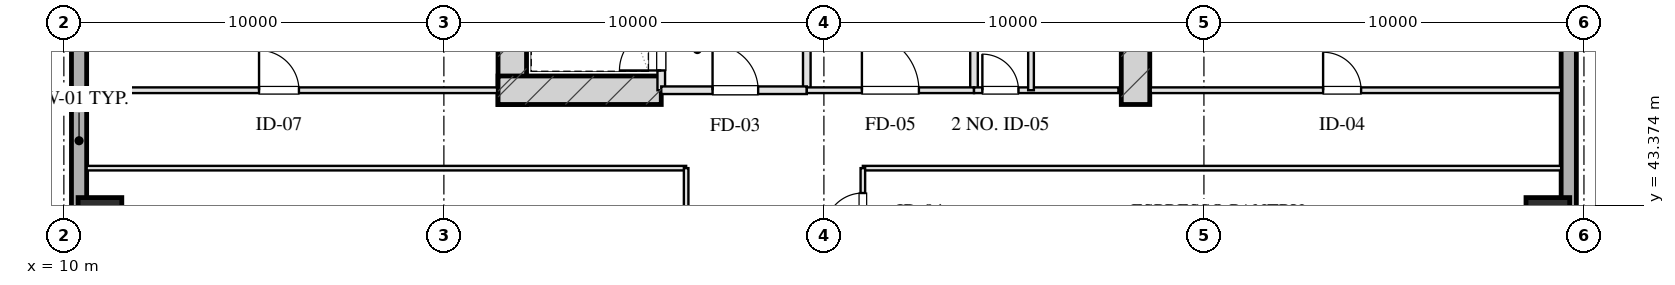
"""IFC4 building model, lengths in metres.
Left out: names, types, materials, properties, quantities, classifications, styles, units other than length and angle.
Written with IfcOpenShell. Run it as: python <this file> out.ifc"""

import sys

from ifc_helpers import new_model, si_unit, direction, frame, frame_2d, origin, origin_2d, place, context, subcontext, project, spatial, rectangle, hollow_rectangle, extrude, element, fill, save


model = new_model("IFC4")
c1 = context("Model", 3, precision=1e-05, world=origin(), true_north=direction((0.0, 1.0)))
c2 = subcontext(c1, "Body", "Model", "MODEL_VIEW")
j1 = project(units=[si_unit("LENGTHUNIT", "METRE"), si_unit("PLANEANGLEUNIT", "RADIAN")], contexts=[c1])
p1 = place(None, origin())
s1 = spatial("IfcSite", under=j1, at=p1, CompositionType="ELEMENT")
p2 = place(p1, origin())
s2 = spatial("IfcBuilding", under=s1, at=p2, CompositionType="ELEMENT")
p3 = place(p2, frame((0.0, 0.0, 60.95)))
s3 = spatial("IfcBuildingStorey", under=s2, at=p3, CompositionType="ELEMENT", Elevation=60.95)
for number, where, z_axis, x_axis in (
    (1, (21.8, 46.025, 0.0), (0.0, 0.0, 1.0), (0.0, 1.0, 0.0)),
    (2, (38.2, 46.025, 0.0), (0.0, 0.0, 1.0), (0.0, 1.0, 0.0)),
):
    element("IfcWall", number, at=place(p3, frame(where, z_axis=z_axis, x_axis=x_axis)), inside=s3, PredefinedType="SHEAR", context=c2, shape_type="SweptSolid", body=[
        extrude(rectangle(XDim=9.63, YDim=0.75, at=frame_2d((4.815, 0.0))), origin(), (0.0, 0.0, 1.0), 3.45),
    ])
p4 = place(p3, frame((21.425, 46.4, 0.0), z_axis=(0.0, 0.0, 1.0), x_axis=(1.0, 0.0, 0.0)))
e3 = element("IfcWall", 3, at=p4, inside=s3, PredefinedType="SHEAR", context=c2, shape_type="SweptSolid", body=[
    extrude(rectangle(XDim=4.295, YDim=0.75, at=frame_2d((2.147, 0.0))), origin(), (0.0, 0.0, 1.0), 3.45),
])
for number, where, z_axis, x_axis in (
    (4, (10.95, 43.0, 0.0), (0.0, 0.0, 1.0), (1.0, 0.0, 0.0)),
    (5, (49.05, 43.0, 0.0), (0.0, 0.0, 1.0), (1.0, 0.0, 0.0)),
):
    element("IfcColumn", number, at=place(p3, frame(where, z_axis=z_axis, x_axis=x_axis)), inside=s3, PredefinedType="COLUMN", context=c2, shape_type="SweptSolid", body=[
        extrude(hollow_rectangle(XDim=1.15, YDim=1.15, WallThickness=0.04, at=origin_2d()), origin(), (0.0, 0.0, 1.0), 3.451),
    ])
p5 = place(p3, frame((10.4, 7.2, 0.0), z_axis=(0.0, 0.0, 1.0), x_axis=(0.0, 1.0, 0.0)))
e6 = element("IfcWall", 6, at=p5, inside=s3, PredefinedType="SOLIDWALL", context=c2, shape_type="SweptSolid", body=[
    extrude(rectangle(XDim=53.6, YDim=0.4, at=frame_2d((26.8, 0.0))), origin(), (0.0, 0.0, 1.0), 2.61),
])
p6 = place(p5, frame((31.95, 0.0, 0.75)))
e7 = element("IfcOpeningElement", 7, at=p6, cuts=e6, PredefinedType="OPENING", context=c2, shape_type="SweptSolid", body=[
    extrude(rectangle(XDim=2.5, YDim=1.46, at=frame_2d((1.25, 0.73))), frame((0.0, 0.21, 0.0), z_axis=(0.0, -1.0, 0.0), x_axis=(1.0, 0.0, 0.0)), (0.0, 0.0, 1.0), 0.42),
])
p7 = place(p5, frame((20.292, 0.0, 0.0)))
e8 = element("IfcOpeningElement", 8, at=p7, cuts=e6, PredefinedType="OPENING", context=c2, shape_type="SweptSolid", body=[
    extrude(rectangle(XDim=1.1, YDim=2.15, at=frame_2d((0.55, 1.075))), frame((0.0, 0.21, 0.0), z_axis=(0.0, -1.0, 0.0), x_axis=(1.0, 0.0, 0.0)), (0.0, 0.0, 1.0), 0.42),
])
p8 = place(p3, frame((49.6, 60.8, 0.0), z_axis=(0.0, 0.0, 1.0), x_axis=(0.0, -1.0, 0.0)))
e9 = element("IfcWall", 9, at=p8, inside=s3, PredefinedType="SOLIDWALL", context=c2, shape_type="SweptSolid", body=[
    extrude(rectangle(XDim=53.6, YDim=0.4, at=frame_2d((26.8, 0.0))), origin(), (0.0, 0.0, 1.0), 2.61),
])
p9 = place(p8, frame((32.05, 0.0, 0.0)))
e10 = element("IfcOpeningElement", 10, at=p9, cuts=e9, PredefinedType="OPENING", context=c2, shape_type="SweptSolid", body=[
    extrude(rectangle(XDim=1.1, YDim=2.15, at=frame_2d((0.55, 1.075))), frame((0.0, 0.21, 0.0), z_axis=(0.0, -1.0, 0.0), x_axis=(1.0, 0.0, 0.0)), (0.0, 0.0, 1.0), 0.42),
])
p10 = place(p3, frame((25.72, 46.4, 0.0), z_axis=(0.0, 0.0, 1.0), x_axis=(0.0, 1.0, 0.0)))
e11 = element("IfcWall", 11, at=p10, inside=s3, PredefinedType="PARTITIONING", context=c2, shape_type="SweptSolid", body=[
    extrude(rectangle(XDim=1.9, YDim=0.2, at=frame_2d((0.95, 0.0))), origin(), (0.0, 0.0, 1.0), 3.175),
])
p11 = place(p10, frame((0.52, 0.0, 0.0)))
e12 = element("IfcOpeningElement", 12, at=p11, cuts=e11, PredefinedType="OPENING", context=c2, shape_type="SweptSolid", body=[
    extrude(rectangle(XDim=1.1, YDim=2.05, at=frame_2d((0.55, 1.025))), frame((0.0, 0.11, 0.0), z_axis=(0.0, -1.0, 0.0), x_axis=(1.0, 0.0, 0.0)), (0.0, 0.0, 1.0), 0.22),
])
p12 = place(p3, frame((29.55, 46.4, 0.0), z_axis=(0.0, 0.0, 1.0), x_axis=(0.0, 1.0, 0.0)))
e13 = element("IfcWall", 13, at=p12, inside=s3, PredefinedType="PARTITIONING", context=c2, shape_type="SweptSolid", body=[
    extrude(rectangle(XDim=8.43, YDim=0.2, at=frame_2d((4.215, 0.0))), origin(), (0.0, 0.0, 1.0), 3.175),
])
p13 = place(p3, frame((25.72, 46.4, 0.0), z_axis=(0.0, 0.0, 1.0), x_axis=(1.0, 0.0, 0.0)))
e14 = element("IfcWall", 14, at=p13, inside=s3, PredefinedType="PARTITIONING", context=c2, shape_type="SweptSolid", body=[
    extrude(rectangle(XDim=3.83, YDim=0.2, at=frame_2d((1.915, 0.0))), origin(), (0.0, 0.0, 1.0), 3.175),
])
p14 = place(p13, frame((1.35, 0.0, 0.0)))
e15 = element("IfcOpeningElement", 15, at=p14, cuts=e14, PredefinedType="OPENING", context=c2, shape_type="SweptSolid", body=[
    extrude(rectangle(XDim=1.2, YDim=2.05, at=frame_2d((0.6, 1.025))), frame((0.0, 0.11, 0.0), z_axis=(0.0, -1.0, 0.0), x_axis=(1.0, 0.0, 0.0)), (0.0, 0.0, 1.0), 0.22),
])
p15 = place(p3, frame((33.95, 46.4, 0.0), z_axis=(0.0, 0.0, 1.0), x_axis=(0.0, 1.0, 0.0)))
e16 = element("IfcWall", 16, at=p15, inside=s3, PredefinedType="PARTITIONING", context=c2, shape_type="SweptSolid", body=[
    extrude(rectangle(XDim=8.43, YDim=0.2, at=frame_2d((4.215, 0.0))), origin(), (0.0, 0.0, 1.0), 3.175),
])
p16 = place(p3, frame((29.55, 46.4, 0.0), z_axis=(0.0, 0.0, 1.0), x_axis=(1.0, 0.0, 0.0)))
e17 = element("IfcWall", 17, at=p16, inside=s3, PredefinedType="PARTITIONING", context=c2, shape_type="SweptSolid", body=[
    extrude(rectangle(XDim=4.4, YDim=0.15, at=frame_2d((2.2, 0.0))), origin(), (0.0, 0.0, 1.0), 3.175),
])
p17 = place(p16, frame((1.45, 0.0, 0.0)))
e18 = element("IfcOpeningElement", 18, at=p17, cuts=e17, PredefinedType="OPENING", context=c2, shape_type="SweptSolid", body=[
    extrude(rectangle(XDim=1.5, YDim=2.05, at=frame_2d((0.75, 1.025))), frame((0.0, 0.085, 0.0), z_axis=(0.0, -1.0, 0.0), x_axis=(1.0, 0.0, 0.0)), (0.0, 0.0, 1.0), 0.17),
])
p18 = place(p3, frame((33.95, 46.4, 0.0), z_axis=(0.0, 0.0, 1.0), x_axis=(1.0, 0.0, 0.0)))
e19 = element("IfcWall", 19, at=p18, inside=s3, PredefinedType="PARTITIONING", context=c2, shape_type="SweptSolid", body=[
    extrude(rectangle(XDim=3.8, YDim=0.15, at=frame_2d((1.9, 0.0))), origin(), (0.0, 0.0, 1.0), 3.175),
])
p19 = place(p18, frame((0.22, 0.0, 0.0)))
e20 = element("IfcOpeningElement", 20, at=p19, cuts=e19, PredefinedType="OPENING", context=c2, shape_type="SweptSolid", body=[
    extrude(rectangle(XDim=0.95, YDim=2.05, at=frame_2d((0.475, 1.025))), frame((0.0, 0.085, 0.0), z_axis=(0.0, -1.0, 0.0), x_axis=(1.0, 0.0, 0.0)), (0.0, 0.0, 1.0), 0.17),
])
p20 = place(p3, frame((35.45, 46.4, 0.0), z_axis=(0.0, 0.0, 1.0), x_axis=(0.0, 1.0, 0.0)))
e21 = element("IfcWall", 21, at=p20, inside=s3, PredefinedType="PARTITIONING", context=c2, shape_type="SweptSolid", body=[
    extrude(rectangle(XDim=8.43, YDim=0.15, at=frame_2d((4.215, 0.0))), origin(), (0.0, 0.0, 1.0), 2.765),
])
p21 = place(p20, frame((2.55, 0.0, 0.0)))
e22 = element("IfcOpeningElement", 22, at=p21, cuts=e21, PredefinedType="OPENING", context=c2, shape_type="SweptSolid", body=[
    extrude(rectangle(XDim=0.95, YDim=2.05, at=frame_2d((0.475, 1.025))), frame((0.0, 0.085, 0.0), z_axis=(0.0, -1.0, 0.0), x_axis=(1.0, 0.0, 0.0)), (0.0, 0.0, 1.0), 0.17),
])
p22 = place(p20, frame((4.7, 0.0, 0.0)))
e23 = element("IfcOpeningElement", 23, at=p22, cuts=e21, PredefinedType="OPENING", context=c2, shape_type="SweptSolid", body=[
    extrude(rectangle(XDim=0.9, YDim=2.05, at=frame_2d((0.45, 1.025))), frame((0.0, 0.085, 0.0), z_axis=(0.0, -1.0, 0.0), x_axis=(1.0, 0.0, 0.0)), (0.0, 0.0, 1.0), 0.17),
])
p23 = place(p20, frame((6.8, 0.0, 0.0)))
e24 = element("IfcOpeningElement", 24, at=p23, cuts=e21, PredefinedType="OPENING", context=c2, shape_type="SweptSolid", body=[
    extrude(rectangle(XDim=0.9, YDim=2.05, at=frame_2d((0.45, 1.025))), frame((0.0, 0.085, 0.0), z_axis=(0.0, -1.0, 0.0), x_axis=(1.0, 0.0, 0.0)), (0.0, 0.0, 1.0), 0.17),
])
p24 = place(p3, frame((10.6, 46.4, 0.0), z_axis=(0.0, 0.0, 1.0), x_axis=(1.0, 0.0, 0.0)))
e25 = element("IfcWall", 25, at=p24, inside=s3, PredefinedType="PARTITIONING", context=c2, shape_type="SweptSolid", body=[
    extrude(rectangle(XDim=10.8, YDim=0.15, at=frame_2d((5.4, 0.0))), origin(), (0.0, 0.0, 1.0), 3.175),
])
p25 = place(p24, frame((4.536, 0.0, 0.0)))
e26 = element("IfcOpeningElement", 26, at=p25, cuts=e25, PredefinedType="OPENING", context=c2, shape_type="SweptSolid", body=[
    extrude(rectangle(XDim=1.05, YDim=2.05, at=frame_2d((0.525, 1.025))), frame((0.0, 0.085, 0.0), z_axis=(0.0, -1.0, 0.0), x_axis=(1.0, 0.0, 0.0)), (0.0, 0.0, 1.0), 0.17),
])
p26 = place(p3, frame((38.6, 46.4, 0.0), z_axis=(0.0, 0.0, 1.0), x_axis=(1.0, 0.0, 0.0)))
e27 = element("IfcWall", 27, at=p26, inside=s3, PredefinedType="PARTITIONING", context=c2, shape_type="SweptSolid", body=[
    extrude(rectangle(XDim=10.8, YDim=0.15, at=frame_2d((5.4, 0.0))), origin(), (0.0, 0.0, 1.0), 3.175),
])
p27 = place(p26, frame((4.536, 0.0, 0.0)))
e28 = element("IfcOpeningElement", 28, at=p27, cuts=e27, PredefinedType="OPENING", context=c2, shape_type="SweptSolid", body=[
    extrude(rectangle(XDim=1.0, YDim=2.05, at=frame_2d((0.5, 1.025))), frame((0.0, 0.085, 0.0), z_axis=(0.0, -1.0, 0.0), x_axis=(1.0, 0.0, 0.0)), (0.0, 0.0, 1.0), 0.17),
])
p28 = place(p3, frame((10.6, 44.35, 0.0), z_axis=(0.0, 0.0, 1.0), x_axis=(1.0, 0.0, 0.0)))
e29 = element("IfcWall", 29, at=p28, inside=s3, PredefinedType="PARTITIONING", context=c2, shape_type="SweptSolid", body=[
    extrude(rectangle(XDim=15.775, YDim=0.12, at=frame_2d((7.887, 0.0))), origin(), (0.0, 0.0, 1.0), 3.175),
])
p29 = place(p3, frame((31.025, 44.35, 0.0), z_axis=(0.0, 0.0, 1.0), x_axis=(1.0, 0.0, 0.0)))
e30 = element("IfcWall", 30, at=p29, inside=s3, PredefinedType="PARTITIONING", context=c2, shape_type="SweptSolid", body=[
    extrude(rectangle(XDim=18.375, YDim=0.12, at=frame_2d((9.188, 0.0))), origin(), (0.0, 0.0, 1.0), 3.175),
])
p30 = place(p3, frame((26.375, 23.65, 0.0), z_axis=(0.0, 0.0, 1.0), x_axis=(0.0, 1.0, 0.0)))
e31 = element("IfcWall", 31, at=p30, inside=s3, PredefinedType="PARTITIONING", context=c2, shape_type="SweptSolid", body=[
    extrude(rectangle(XDim=20.7, YDim=0.12, at=frame_2d((10.35, 0.0))), origin(), (0.0, 0.0, 1.0), 3.175),
])
p31 = place(p30, frame((2.518, 0.0, 0.0)))
e32 = element("IfcOpeningElement", 32, at=p31, cuts=e31, PredefinedType="OPENING", context=c2, shape_type="SweptSolid", body=[
    extrude(rectangle(XDim=1.0, YDim=2.05, at=frame_2d((0.5, 1.025))), frame((0.0, 0.07, 0.0), z_axis=(0.0, -1.0, 0.0), x_axis=(1.0, 0.0, 0.0)), (0.0, 0.0, 1.0), 0.14),
])
p32 = place(p30, frame((9.692, 0.0, 0.0)))
e33 = element("IfcOpeningElement", 33, at=p32, cuts=e31, PredefinedType="OPENING", context=c2, shape_type="SweptSolid", body=[
    extrude(rectangle(XDim=1.0, YDim=2.05, at=frame_2d((0.5, 1.025))), frame((0.0, 0.07, 0.0), z_axis=(0.0, -1.0, 0.0), x_axis=(1.0, 0.0, 0.0)), (0.0, 0.0, 1.0), 0.14),
])
p33 = place(p30, frame((17.025, 0.0, 0.0)))
e34 = element("IfcOpeningElement", 34, at=p33, cuts=e31, PredefinedType="OPENING", context=c2, shape_type="SweptSolid", body=[
    extrude(rectangle(XDim=1.0, YDim=2.05, at=frame_2d((0.5, 1.025))), frame((0.0, 0.07, 0.0), z_axis=(0.0, -1.0, 0.0), x_axis=(1.0, 0.0, 0.0)), (0.0, 0.0, 1.0), 0.14),
])
p34 = place(p3, frame((31.025, 23.65, 0.0), z_axis=(0.0, 0.0, 1.0), x_axis=(0.0, 1.0, 0.0)))
e35 = element("IfcWall", 35, at=p34, inside=s3, PredefinedType="PARTITIONING", context=c2, shape_type="SweptSolid", body=[
    extrude(rectangle(XDim=20.7, YDim=0.12, at=frame_2d((10.35, 0.0))), origin(), (0.0, 0.0, 1.0), 3.175),
])
p35 = place(p34, frame((0.775, 0.0, 0.0)))
e36 = element("IfcOpeningElement", 36, at=p35, cuts=e35, PredefinedType="OPENING", context=c2, shape_type="SweptSolid", body=[
    extrude(rectangle(XDim=1.0, YDim=2.05, at=frame_2d((0.5, 1.025))), frame((0.0, 0.07, 0.0), z_axis=(0.0, -1.0, 0.0), x_axis=(1.0, 0.0, 0.0)), (0.0, 0.0, 1.0), 0.14),
])
p36 = place(p34, frame((3.95, 0.0, 0.0)))
e37 = element("IfcOpeningElement", 37, at=p36, cuts=e35, PredefinedType="OPENING", context=c2, shape_type="SweptSolid", body=[
    extrude(rectangle(XDim=1.0, YDim=2.05, at=frame_2d((0.5, 1.025))), frame((0.0, 0.07, 0.0), z_axis=(0.0, -1.0, 0.0), x_axis=(1.0, 0.0, 0.0)), (0.0, 0.0, 1.0), 0.14),
])
p37 = place(p34, frame((8.455, 0.0, 0.0)))
e38 = element("IfcOpeningElement", 38, at=p37, cuts=e35, PredefinedType="OPENING", context=c2, shape_type="SweptSolid", body=[
    extrude(rectangle(XDim=1.05, YDim=2.05, at=frame_2d((0.525, 1.025))), frame((0.0, 0.07, 0.0), z_axis=(0.0, -1.0, 0.0), x_axis=(1.0, 0.0, 0.0)), (0.0, 0.0, 1.0), 0.14),
])
p38 = place(p34, frame((12.923, 0.0, 0.0)))
e39 = element("IfcOpeningElement", 39, at=p38, cuts=e35, PredefinedType="OPENING", context=c2, shape_type="SweptSolid", body=[
    extrude(rectangle(XDim=0.85, YDim=2.05, at=frame_2d((0.425, 1.025))), frame((0.0, 0.07, 0.0), z_axis=(0.0, -1.0, 0.0), x_axis=(1.0, 0.0, 0.0)), (0.0, 0.0, 1.0), 0.14),
])
p39 = place(p34, frame((16.338, 0.0, 0.0)))
e40 = element("IfcOpeningElement", 40, at=p39, cuts=e35, PredefinedType="OPENING", context=c2, shape_type="SweptSolid", body=[
    extrude(rectangle(XDim=1.0, YDim=2.05, at=frame_2d((0.5, 1.025))), frame((0.0, 0.07, 0.0), z_axis=(0.0, -1.0, 0.0), x_axis=(1.0, 0.0, 0.0)), (0.0, 0.0, 1.0), 0.14),
])
p40 = place(p34, frame((19.045, 0.0, 0.0)))
e41 = element("IfcOpeningElement", 41, at=p40, cuts=e35, PredefinedType="OPENING", context=c2, shape_type="SweptSolid", body=[
    extrude(rectangle(XDim=1.0, YDim=2.05, at=frame_2d((0.5, 1.025))), frame((0.0, 0.07, 0.0), z_axis=(0.0, -1.0, 0.0), x_axis=(1.0, 0.0, 0.0)), (0.0, 0.0, 1.0), 0.14),
])
p41 = place(p11, origin())
e42 = element("IfcDoor", 42, at=p41, inside=s3, OperationType="SINGLE_SWING_LEFT", PredefinedType="DOOR", context=c2, shape_type="SweptSolid", body=[
    extrude(rectangle(XDim=1.1, YDim=2.05, at=frame_2d((0.55, 1.025))), frame((0.0, 0.025, 0.0), z_axis=(0.0, -1.0, 0.0), x_axis=(1.0, 0.0, 0.0)), (0.0, 0.0, 1.0), 0.05),
])
fill(e12, e42)
p42 = place(p14, origin())
e43 = element("IfcDoor", 43, at=p42, inside=s3, OperationType="SINGLE_SWING_LEFT", PredefinedType="DOOR", context=c2, shape_type="SweptSolid", body=[
    extrude(rectangle(XDim=1.2, YDim=2.05, at=frame_2d((0.6, 1.025))), frame((0.0, 0.025, 0.0), z_axis=(0.0, -1.0, 0.0), x_axis=(1.0, 0.0, 0.0)), (0.0, 0.0, 1.0), 0.05),
])
fill(e15, e43)
p43 = place(p17, origin())
e44 = element("IfcDoor", 44, at=p43, inside=s3, OperationType="SINGLE_SWING_LEFT", PredefinedType="DOOR", context=c2, shape_type="SweptSolid", body=[
    extrude(rectangle(XDim=1.5, YDim=2.05, at=frame_2d((0.75, 1.025))), frame((0.0, 0.025, 0.0), z_axis=(0.0, -1.0, 0.0), x_axis=(1.0, 0.0, 0.0)), (0.0, 0.0, 1.0), 0.05),
])
fill(e18, e44)
p44 = place(p19, origin())
e45 = element("IfcDoor", 45, at=p44, inside=s3, OperationType="SINGLE_SWING_LEFT", PredefinedType="DOOR", context=c2, shape_type="SweptSolid", body=[
    extrude(rectangle(XDim=0.95, YDim=2.05, at=frame_2d((0.475, 1.025))), frame((0.0, 0.025, 0.0), z_axis=(0.0, -1.0, 0.0), x_axis=(1.0, 0.0, 0.0)), (0.0, 0.0, 1.0), 0.05),
])
fill(e20, e45)
p45 = place(p25, origin())
e46 = element("IfcDoor", 46, at=p45, inside=s3, OperationType="SINGLE_SWING_LEFT", PredefinedType="DOOR", context=c2, shape_type="SweptSolid", body=[
    extrude(rectangle(XDim=1.05, YDim=2.05, at=frame_2d((0.525, 1.025))), frame((0.0, 0.025, 0.0), z_axis=(0.0, -1.0, 0.0), x_axis=(1.0, 0.0, 0.0)), (0.0, 0.0, 1.0), 0.05),
])
fill(e26, e46)
p46 = place(p27, origin())
e47 = element("IfcDoor", 47, at=p46, inside=s3, OperationType="SINGLE_SWING_LEFT", PredefinedType="DOOR", context=c2, shape_type="SweptSolid", body=[
    extrude(rectangle(XDim=1.0, YDim=2.05, at=frame_2d((0.5, 1.025))), frame((0.0, 0.025, 0.0), z_axis=(0.0, -1.0, 0.0), x_axis=(1.0, 0.0, 0.0)), (0.0, 0.0, 1.0), 0.05),
])
fill(e28, e47)
p47 = place(p40, origin())
e48 = element("IfcDoor", 48, at=p47, inside=s3, OperationType="SINGLE_SWING_LEFT", PredefinedType="DOOR", context=c2, shape_type="SweptSolid", body=[
    extrude(rectangle(XDim=1.0, YDim=2.05, at=frame_2d((0.5, 1.025))), frame((0.0, 0.025, 0.0), z_axis=(0.0, -1.0, 0.0), x_axis=(1.0, 0.0, 0.0)), (0.0, 0.0, 1.0), 0.05),
])
fill(e41, e48)
save(model, sys.argv[1])
